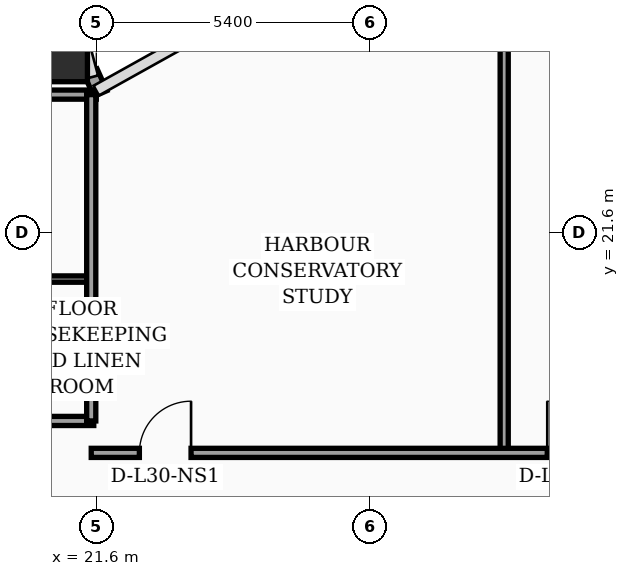
"""IFC4 building model, lengths in metres.
Left out: names, types, materials, properties, quantities, classifications, styles, units other than length and angle.
Written with IfcOpenShell. Run it as: python <this file> out.ifc"""

import sys

from ifc_helpers import new_model, si_unit, direction, frame, frame_2d, origin, origin_2d, place, context, subcontext, project, spatial, rectangle, hollow_rectangle, extrude, element, fill, save


model = new_model("IFC4")
c1 = context("Model", 3, precision=1e-05, world=origin(), true_north=direction((0.0, 1.0)))
c2 = subcontext(c1, "Body", "Model", "MODEL_VIEW")
j1 = project(units=[si_unit("LENGTHUNIT", "METRE"), si_unit("PLANEANGLEUNIT", "RADIAN")], contexts=[c1])
p1 = place(None, origin())
s1 = spatial("IfcSite", under=j1, at=p1, CompositionType="ELEMENT")
p2 = place(p1, origin())
s2 = spatial("IfcBuilding", under=s1, at=p2, CompositionType="ELEMENT")
p3 = place(p2, frame((0.0, 0.0, 124.0)))
s3 = spatial("IfcBuildingStorey", under=s2, at=p3, CompositionType="ELEMENT", Elevation=124.0)
p4 = place(p3, frame((21.0, 25.0, 0.0), z_axis=(0.0, 0.0, 1.0), x_axis=(1.0, 0.0, 0.0)))
e1 = element("IfcColumn", 1, at=p4, inside=s3, PredefinedType="COLUMN", context=c2, shape_type="SweptSolid", body=[
    extrude(hollow_rectangle(XDim=0.85, YDim=0.85, WallThickness=0.036, at=origin_2d()), origin(), (0.0, 0.0, 1.0), 3.56),
])
p5 = place(p3, frame((21.68, 24.34, 0.0), z_axis=(0.0, 0.0, 1.0), x_axis=(-0.40758134973, 0.913168901875, 0.0)))
e2 = element("IfcWall", 2, at=p5, inside=s3, PredefinedType="SOLIDWALL", context=c2, shape_type="SweptSolid", body=[
    extrude(rectangle(XDim=0.471, YDim=0.28, at=frame_2d((0.235, 0.0))), origin(), (0.0, 0.0, 1.0), 3.56),
])
p6 = place(p3, frame((17.25, 17.88, 0.0), z_axis=(0.0, 0.0, 1.0), x_axis=(1.0, 0.0, 0.0)))
e3 = element("IfcWall", 3, at=p6, inside=s3, PredefinedType="PARTITIONING", context=c2, shape_type="SweptSolid", body=[
    extrude(rectangle(XDim=4.3, YDim=0.18, at=frame_2d((2.15, 0.0))), origin(), (0.0, 0.0, 1.0), 3.09),
])
p7 = place(p3, frame((17.25, 20.68, 0.0), z_axis=(0.0, 0.0, 1.0), x_axis=(1.0, 0.0, 0.0)))
e4 = element("IfcWall", 4, at=p7, inside=s3, PredefinedType="PARTITIONING", context=c2, shape_type="SweptSolid", body=[
    extrude(rectangle(XDim=4.3, YDim=0.125, at=frame_2d((2.15, 0.0))), origin(), (0.0, 0.0, 1.0), 3.56),
])
p8 = place(p3, frame((17.25, 24.32, 0.0), z_axis=(0.0, 0.0, 1.0), x_axis=(1.0, 0.0, 0.0)))
e5 = element("IfcWall", 5, at=p8, inside=s3, PredefinedType="PARTITIONING", context=c2, shape_type="SweptSolid", body=[
    extrude(rectangle(XDim=4.35, YDim=0.18, at=frame_2d((2.175, 0.0))), origin(), (0.0, 0.0, 1.0), 3.56),
])
p9 = place(p3, frame((21.5, 17.88, 0.0), z_axis=(0.0, 0.0, 1.0), x_axis=(0.0, 1.0, 0.0)))
e6 = element("IfcWall", 6, at=p9, inside=s3, PredefinedType="PARTITIONING", context=c2, shape_type="SweptSolid", body=[
    extrude(rectangle(XDim=6.44, YDim=0.18, at=frame_2d((3.22, 0.0))), origin(), (0.0, 0.0, 1.0), 3.09),
])
p10 = place(p3, frame((29.65, 17.25, 0.0), z_axis=(0.0, 0.0, 1.0), x_axis=(0.0, 1.0, 0.0)))
e7 = element("IfcWall", 7, at=p10, inside=s3, PredefinedType="PARTITIONING", context=c2, shape_type="SweptSolid", body=[
    extrude(rectangle(XDim=11.72, YDim=0.16, at=frame_2d((5.86, 0.0))), origin(), (0.0, 0.0, 1.0), 2.84),
])
p11 = place(p3, frame((21.5, 17.25, 0.0), z_axis=(0.0, 0.0, 1.0), x_axis=(1.0, 0.0, 0.0)))
e8 = element("IfcWall", 8, at=p11, inside=s3, PredefinedType="PARTITIONING", context=c2, shape_type="SweptSolid", body=[
    extrude(rectangle(XDim=24.25, YDim=0.18, at=frame_2d((12.125, 0.0))), origin(), (0.0, 0.0, 1.0), 2.84),
])
p12 = place(p11, frame((0.95, 0.0, 0.0)))
e9 = element("IfcOpeningElement", 9, at=p12, cuts=e8, PredefinedType="OPENING", context=c2, shape_type="SweptSolid", body=[
    extrude(rectangle(XDim=1.02, YDim=2.2, at=frame_2d((0.51, 1.1))), frame((0.0, 0.1, 0.0), z_axis=(0.0, -1.0, 0.0), x_axis=(1.0, 0.0, 0.0)), (0.0, 0.0, 1.0), 0.2),
])
p13 = place(p11, frame((9.0, 0.0, 0.0)))
e10 = element("IfcOpeningElement", 10, at=p13, cuts=e8, PredefinedType="OPENING", context=c2, shape_type="SweptSolid", body=[
    extrude(rectangle(XDim=1.02, YDim=2.2, at=frame_2d((0.51, 1.1))), frame((0.0, 0.1, 0.0), z_axis=(0.0, -1.0, 0.0), x_axis=(1.0, 0.0, 0.0)), (0.0, 0.0, 1.0), 0.2),
])
p14 = place(p11, frame((17.05, 0.0, 0.0)))
e11 = element("IfcOpeningElement", 11, at=p14, cuts=e8, PredefinedType="OPENING", context=c2, shape_type="SweptSolid", body=[
    extrude(rectangle(XDim=1.02, YDim=2.2, at=frame_2d((0.51, 1.1))), frame((0.0, 0.1, 0.0), z_axis=(0.0, -1.0, 0.0), x_axis=(1.0, 0.0, 0.0)), (0.0, 0.0, 1.0), 0.2),
])
p15 = place(p12, origin())
e12 = element("IfcDoor", 12, at=p15, inside=s3, OperationType="SINGLE_SWING_RIGHT", PredefinedType="DOOR", context=c2, shape_type="SweptSolid", body=[
    extrude(rectangle(XDim=1.02, YDim=2.2, at=frame_2d((0.51, 1.1))), frame((0.0, 0.025, 0.0), z_axis=(0.0, -1.0, 0.0), x_axis=(1.0, 0.0, 0.0)), (0.0, 0.0, 1.0), 0.05),
])
fill(e9, e12)
p16 = place(p13, origin())
e13 = element("IfcDoor", 13, at=p16, inside=s3, OperationType="SINGLE_SWING_LEFT", PredefinedType="DOOR", context=c2, shape_type="SweptSolid", body=[
    extrude(rectangle(XDim=1.02, YDim=2.2, at=frame_2d((0.51, 1.1))), frame((0.0, 0.025, 0.0), z_axis=(0.0, -1.0, 0.0), x_axis=(1.0, 0.0, 0.0)), (0.0, 0.0, 1.0), 0.05),
])
fill(e10, e13)
save(model, sys.argv[1])
